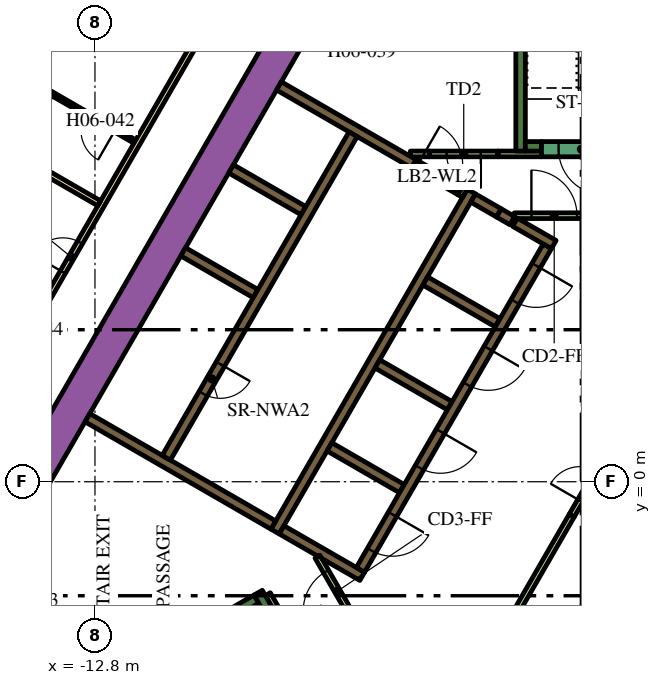
"""IFC4 building model, lengths in metres.
Left out: names, types, materials, properties, quantities, classifications, styles, units other than length and angle.
Written with IfcOpenShell. Run it as: python <this file> out.ifc"""

import sys

from ifc_helpers import new_model, si_unit, direction, frame, frame_2d, origin, place, context, subcontext, project, spatial, polyline, rectangle, outline, extrude, element, fill, save


model = new_model("IFC4")
c1 = context("Model", 3, precision=1e-05, world=origin(), true_north=direction((0.0, 1.0)))
c2 = subcontext(c1, "Body", "Model", "MODEL_VIEW")
j1 = project(units=[si_unit("LENGTHUNIT", "METRE"), si_unit("PLANEANGLEUNIT", "RADIAN")], contexts=[c1])
p1 = place(None, origin())
s1 = spatial("IfcSite", under=j1, at=p1, CompositionType="ELEMENT")
p2 = place(p1, origin())
s2 = spatial("IfcBuilding", under=s1, at=p2, CompositionType="ELEMENT")
p3 = place(p2, frame((0.0, 0.0, 83.7)))
s3 = spatial("IfcBuildingStorey", under=s2, at=p3, CompositionType="ELEMENT", Elevation=83.7)
p4 = place(p3, frame((-15.36, -1.503, 0.0), z_axis=(0.0, 0.0, 1.0), x_axis=(0.50000389221, 0.866023156604, 0.0)))
e1 = element("IfcWall", 1, at=p4, inside=s3, PredefinedType="SOLIDWALL", context=c2, shape_type="SweptSolid", body=[
    extrude(rectangle(XDim=21.0, YDim=0.9, at=frame_2d((10.5, 0.0))), origin(), (0.0, 0.0, 1.0), 3.9),
])
p5 = place(p3, frame((-1.6, 8.7, 0.0), z_axis=(0.0, 0.0, 1.0), x_axis=(0.0, 1.0, 0.0)))
e2 = element("IfcWall", 2, at=p5, inside=s3, PredefinedType="SOLIDWALL", context=c2, shape_type="SweptSolid", body=[
    extrude(rectangle(XDim=7.05, YDim=0.25, at=frame_2d((3.525, 0.0))), origin(), (0.0, 0.0, 1.0), 3.9),
])
p6 = place(p3, frame((-1.475, 8.825, 0.0), z_axis=(0.0, 0.0, 1.0), x_axis=(1.0, 0.0, 0.0)))
e3 = element("IfcWall", 3, at=p6, inside=s3, PredefinedType="SOLIDWALL", context=c2, shape_type="SweptSolid", body=[
    extrude(rectangle(XDim=0.425, YDim=0.25, at=frame_2d((0.212, 0.0))), origin(), (0.0, 0.0, 1.0), 3.9),
])
p7 = place(p3, frame((-14.44, -6.49, 0.0), z_axis=(0.0, 0.0, 1.0), x_axis=(0.866022966069, 0.500004222222, 0.0)))
e4 = element("IfcWall", 4, at=p7, inside=s3, PredefinedType="SOLIDWALL", context=c2, shape_type="SweptSolid", body=[
    extrude(rectangle(XDim=6.8, YDim=0.25, at=frame_2d((3.4, 0.0))), origin(), (0.0, 0.0, 1.0), 3.9),
])
p8 = place(p3, frame((-8.168, -3.503, 0.0), z_axis=(0.0, 0.0, 1.0), x_axis=(-0.499952099219, 0.866053057547, 0.0)))
e5 = element("IfcWall", 5, at=p8, inside=s3, PredefinedType="SOLIDWALL", context=c2, shape_type="SweptSolid", body=[
    extrude(rectangle(XDim=0.675, YDim=0.25, at=frame_2d((0.337, 0.0))), origin(), (0.0, 0.0, 1.0), 3.9),
])
p9 = place(p3, frame((-8.06, -1.311, 0.0), z_axis=(0.0, 0.0, 1.0), x_axis=(0.50000273126, 0.866023826885, 0.0)))
e6 = element("IfcWall", 6, at=p9, inside=s3, PredefinedType="SOLIDWALL", context=c2, shape_type="SweptSolid", body=[
    extrude(rectangle(XDim=10.33, YDim=0.25, at=frame_2d((5.165, 0.0))), origin(), (0.0, 0.0, 1.0), 3.9),
])
p10 = place(p3, frame((-1.819, 6.87, 0.0), z_axis=(0.0, 0.0, 1.0), x_axis=(-0.866294599386, 0.499533449405, 0.0)))
e7 = element("IfcWall", 7, at=p10, inside=s3, PredefinedType="SOLIDWALL", context=c2, shape_type="SweptSolid", body=[
    extrude(rectangle(XDim=0.41, YDim=0.25, at=frame_2d((0.205, 0.0))), origin(), (0.0, 0.0, 1.0), 3.9),
])
p11 = place(p3, frame((-2.849, 7.465, 0.0), z_axis=(0.0, 0.0, 1.0), x_axis=(0.865955664968, -0.500120771724, 0.0)))
e8 = element("IfcWall", 8, at=p11, inside=s3, PredefinedType="SOLIDWALL", context=c2, shape_type="SweptSolid", body=[
    extrude(rectangle(XDim=0.778, YDim=0.25, at=frame_2d((0.389, 0.0))), origin(), (0.0, 0.0, 1.0), 3.9),
])
p12 = place(p3, frame((-0.728, 6.24, 0.0), z_axis=(0.0, 0.0, 1.0), x_axis=(-0.866002680491, 0.500039355833, 0.0)))
e9 = element("IfcWall", 9, at=p12, inside=s3, PredefinedType="SOLIDWALL", context=c2, shape_type="SweptSolid", body=[
    extrude(rectangle(XDim=1.178, YDim=0.25, at=frame_2d((0.589, 0.0))), origin(), (0.0, 0.0, 1.0), 3.9),
])
for number, where, z_axis, x_axis in (
    (10, (-2.204, 4.182, 0.0), (0.0, 0.0, 1.0), (-0.866, 0.5, 0.0)),
    (11, (-5.369, 3.1, 0.0), (0.0, 0.0, 1.0), (0.866, -0.5, 0.0)),
    (12, (-4.724, -0.182, 0.0), (0.0, 0.0, 1.0), (-0.866, 0.5, 0.0)),
):
    element("IfcWall", number, at=place(p3, frame(where, z_axis=z_axis, x_axis=x_axis)), inside=s3, PredefinedType="SOLIDWALL", context=c2, shape_type="SweptSolid", body=[
        extrude(rectangle(XDim=2.2, YDim=0.25, at=frame_2d((1.1, 0.0))), origin(), (0.0, 0.0, 1.0), 3.9),
    ])
p13 = place(p3, origin())
e13 = element("IfcWall", 13, at=p13, inside=s3, PredefinedType="SOLIDWALL", context=c2, shape_type="SweptSolid", body=[
    extrude(outline(polyline([(-5.922, -2.257), (-5.922, -2.257), (-5.705, -2.382), (-5.83, -2.598), (-6.829, -2.021), (-6.88, -1.934), (-6.88, -1.934), (-6.93, -1.963), (-7.952, -1.373), (-7.827, -1.156), (-5.922, -2.257)])), origin(), (0.0, 0.0, 1.0), 3.9),
])
p14 = place(p3, frame((-8.106, -1.14, 0.0), z_axis=(0.0, 0.0, 1.0), x_axis=(-0.866000643155, 0.500042884217, 0.0)))
e14 = element("IfcWall", 14, at=p14, inside=s3, PredefinedType="SOLIDWALL", context=c2, shape_type="SweptSolid", body=[
    extrude(rectangle(XDim=5.65, YDim=0.25, at=frame_2d((2.825, 0.0))), origin(), (0.0, 0.0, 1.0), 3.9),
])
e15 = element("IfcWall", 15, at=p13, inside=s3, PredefinedType="SOLIDWALL", context=c2, shape_type="SweptSolid", body=[
    extrude(outline(polyline([(-3.128, 7.481), (-3.259, 7.557), (-3.134, 7.773), (-3.003, 7.698), (-3.128, 7.481)])), origin(), (0.0, 0.0, 1.0), 3.9),
])
for number, where, z_axis, x_axis in (
    (16, (-8.574, 4.95, 0.0), (0.0, 0.0, 1.0), (-0.866, 0.5, 0.0)),
    (17, (-7.314, 7.132, 0.0), (0.0, 0.0, 1.0), (-0.866, 0.5, 0.0)),
):
    element("IfcWall", number, at=place(p3, frame(where, z_axis=z_axis, x_axis=x_axis)), inside=s3, PredefinedType="SOLIDWALL", context=c2, shape_type="SweptSolid", body=[
        extrude(rectangle(XDim=2.2, YDim=0.25, at=frame_2d((1.1, 0.0))), origin(), (0.0, 0.0, 1.0), 3.9),
    ])
p15 = place(p3, frame((-7.959, 10.415, 0.0), z_axis=(0.0, 0.0, 1.0), x_axis=(0.866020958405, -0.500007699544, 0.0)))
e18 = element("IfcWall", 18, at=p15, inside=s3, PredefinedType="SOLIDWALL", context=c2, shape_type="SweptSolid", body=[
    extrude(rectangle(XDim=4.1, YDim=0.25, at=frame_2d((2.05, 0.0))), origin(), (0.0, 0.0, 1.0), 3.9),
])
p16 = place(p3, frame((-8.252, -2.958, 0.0), z_axis=(0.0, 0.0, 1.0), x_axis=(0.500174715838, -0.865924508047, 0.0)))
e19 = element("IfcWall", 19, at=p16, inside=s3, PredefinedType="PARTITIONING", context=c2, shape_type="SweptSolid", body=[
    extrude(rectangle(XDim=0.514, YDim=0.15, at=frame_2d((0.257, 0.0))), origin(), (0.0, 0.0, 1.0), 2.75),
])
p17 = place(p3, frame((-3.997, 8.625, 0.0), z_axis=(0.0, 0.0, 1.0), x_axis=(-1.0, 0.0, 0.0)))
e20 = element("IfcWall", 20, at=p17, inside=s3, PredefinedType="PARTITIONING", context=c2, shape_type="SweptSolid", body=[
    extrude(rectangle(XDim=0.502, YDim=0.15, at=frame_2d((0.251, 0.0))), origin(), (0.0, 0.0, 1.0), 2.75),
])
p18 = place(p3, frame((-1.887, -3.718, 0.0), z_axis=(0.0, 0.0, 1.0), x_axis=(0.500033287521, 0.866006184372, 0.0)))
e21 = element("IfcWall", 21, at=p18, inside=s3, PredefinedType="PARTITIONING", context=c2, shape_type="SweptSolid", body=[
    extrude(rectangle(XDim=3.263, YDim=0.15, at=frame_2d((1.632, 0.0))), origin(), (0.0, 0.0, 1.0), 2.75),
])
p19 = place(p3, frame((-2.196, 8.625, 0.0), z_axis=(0.0, 0.0, 1.0), x_axis=(1.0, 0.0, 0.0)))
e22 = element("IfcWall", 22, at=p19, inside=s3, PredefinedType="PARTITIONING", context=c2, shape_type="SweptSolid", body=[
    extrude(rectangle(XDim=1.146, YDim=0.15, at=frame_2d((0.573, 0.0))), origin(), (0.0, 0.0, 1.0), 2.75),
])
p20 = place(p3, frame((-6.008, 9.144, 0.0), z_axis=(0.0, 0.0, 1.0), x_axis=(-0.500006956611, -0.866021387346, 0.0)))
e23 = element("IfcWall", 23, at=p20, inside=s3, PredefinedType="SOLIDWALL", context=c2, shape_type="SweptSolid", body=[
    extrude(rectangle(XDim=9.83, YDim=0.25, at=frame_2d((4.915, 0.0))), origin(), (0.0, 0.0, 1.0), 3.9),
])
p21 = place(p20, frame((6.985, 0.0, 0.0)))
e24 = element("IfcOpeningElement", 24, at=p21, cuts=e23, PredefinedType="OPENING", context=c2, shape_type="SweptSolid", body=[
    extrude(rectangle(XDim=0.9, YDim=2.1, at=frame_2d((0.45, 1.05))), frame((0.0, 0.135, 0.0), z_axis=(0.0, -1.0, 0.0), x_axis=(1.0, 0.0, 0.0)), (0.0, 0.0, 1.0), 0.27),
])
p22 = place(p3, frame((-0.898, 6.194, 0.0), z_axis=(0.0, 0.0, 1.0), x_axis=(-0.499996202215, -0.866027596426, 0.0)))
e25 = element("IfcWall", 25, at=p22, inside=s3, PredefinedType="SOLIDWALL", context=c2, shape_type="SweptSolid", body=[
    extrude(rectangle(XDim=9.83, YDim=0.25, at=frame_2d((4.915, 0.0))), origin(), (0.0, 0.0, 1.0), 3.9),
])
p23 = place(p22, frame((0.585, 0.0, 0.0)))
e26 = element("IfcOpeningElement", 26, at=p23, cuts=e25, PredefinedType="OPENING", context=c2, shape_type="SweptSolid", body=[
    extrude(rectangle(XDim=1.1, YDim=2.1, at=frame_2d((0.55, 1.05))), frame((0.0, 0.135, 0.0), z_axis=(0.0, -1.0, 0.0), x_axis=(1.0, 0.0, 0.0)), (0.0, 0.0, 1.0), 0.27),
])
p24 = place(p22, frame((3.105, 0.0, 0.0)))
e27 = element("IfcOpeningElement", 27, at=p24, cuts=e25, PredefinedType="OPENING", context=c2, shape_type="SweptSolid", body=[
    extrude(rectangle(XDim=1.1, YDim=2.1, at=frame_2d((0.55, 1.05))), frame((0.0, 0.135, 0.0), z_axis=(0.0, -1.0, 0.0), x_axis=(1.0, 0.0, 0.0)), (0.0, 0.0, 1.0), 0.27),
])
p25 = place(p22, frame((5.625, 0.0, 0.0)))
e28 = element("IfcOpeningElement", 28, at=p25, cuts=e25, PredefinedType="OPENING", context=c2, shape_type="SweptSolid", body=[
    extrude(rectangle(XDim=1.1, YDim=2.1, at=frame_2d((0.55, 1.05))), frame((0.0, 0.135, 0.0), z_axis=(0.0, -1.0, 0.0), x_axis=(1.0, 0.0, 0.0)), (0.0, 0.0, 1.0), 0.27),
])
p26 = place(p22, frame((8.145, 0.0, 0.0)))
e29 = element("IfcOpeningElement", 29, at=p26, cuts=e25, PredefinedType="OPENING", context=c2, shape_type="SweptSolid", body=[
    extrude(rectangle(XDim=1.1, YDim=2.1, at=frame_2d((0.55, 1.05))), frame((0.0, 0.135, 0.0), z_axis=(0.0, -1.0, 0.0), x_axis=(1.0, 0.0, 0.0)), (0.0, 0.0, 1.0), 0.27),
])
p27 = place(p3, frame((1.05, 8.75, 0.0), z_axis=(0.0, 0.0, 1.0), x_axis=(-1.0, 0.0, 0.0)))
e30 = element("IfcWall", 30, at=p27, inside=s3, PredefinedType="SOLIDWALL", context=c2, shape_type="SweptSolid", body=[
    extrude(rectangle(XDim=2.1, YDim=0.4, at=frame_2d((1.05, 0.0))), origin(), (0.0, 0.0, 1.0), 3.9),
])
p28 = place(p27, frame((0.45, 0.0, 0.0)))
e31 = element("IfcOpeningElement", 31, at=p28, cuts=e30, PredefinedType="OPENING", context=c2, shape_type="SweptSolid", body=[
    extrude(rectangle(XDim=1.2, YDim=2.1, at=frame_2d((0.6, 1.05))), frame((0.0, 0.21, 0.0), z_axis=(0.0, -1.0, 0.0), x_axis=(1.0, 0.0, 0.0)), (0.0, 0.0, 1.0), 0.42),
])
p29 = place(p3, frame((-2.196, 8.625, 0.0), z_axis=(0.0, 0.0, 1.0), x_axis=(-1.0, 0.0, 0.0)))
e32 = element("IfcWall", 32, at=p29, inside=s3, PredefinedType="PARTITIONING", context=c2, shape_type="SweptSolid", body=[
    extrude(rectangle(XDim=1.8, YDim=0.15, at=frame_2d((0.9, 0.0))), origin(), (0.0, 0.0, 1.0), 2.75),
])
p30 = place(p29, frame((0.45, 0.0, 0.0)))
e33 = element("IfcOpeningElement", 33, at=p30, cuts=e32, PredefinedType="OPENING", context=c2, shape_type="SweptSolid", body=[
    extrude(rectangle(XDim=0.9, YDim=2.1, at=frame_2d((0.45, 1.05))), frame((0.0, 0.085, 0.0), z_axis=(0.0, -1.0, 0.0), x_axis=(1.0, 0.0, 0.0)), (0.0, 0.0, 1.0), 0.17),
])
p31 = place(p3, frame((-1.765, 7.0, 0.0), z_axis=(0.0, 0.0, 1.0), x_axis=(1.0, 0.0, 0.0)))
e34 = element("IfcWall", 34, at=p31, inside=s3, PredefinedType="PARTITIONING", context=c2, shape_type="SweptSolid", body=[
    extrude(rectangle(XDim=2.1, YDim=0.15, at=frame_2d((1.05, 0.0))), origin(), (0.0, 0.0, 1.0), 2.75),
])
p32 = place(p31, frame((0.45, 0.0, 0.0)))
e35 = element("IfcOpeningElement", 35, at=p32, cuts=e34, PredefinedType="OPENING", context=c2, shape_type="SweptSolid", body=[
    extrude(rectangle(XDim=1.2, YDim=2.1, at=frame_2d((0.6, 1.05))), frame((0.0, 0.085, 0.0), z_axis=(0.0, -1.0, 0.0), x_axis=(1.0, 0.0, 0.0)), (0.0, 0.0, 1.0), 0.17),
])
p33 = place(p3, frame((-5.895, -3.79, 0.0), z_axis=(0.0, 0.0, 1.0), x_axis=(-0.49994051562, 0.866059744384, 0.0)))
e36 = element("IfcWall", 36, at=p33, inside=s3, PredefinedType="PARTITIONING", context=c2, shape_type="SweptSolid", body=[
    extrude(rectangle(XDim=2.1, YDim=0.15, at=frame_2d((1.05, 0.0))), origin(), (0.0, 0.0, 1.0), 2.75),
])
p34 = place(p33, frame((0.45, 0.0, 0.0)))
e37 = element("IfcOpeningElement", 37, at=p34, cuts=e36, PredefinedType="OPENING", context=c2, shape_type="SweptSolid", body=[
    extrude(rectangle(XDim=1.2, YDim=2.1, at=frame_2d((0.6, 1.05))), frame((0.0, 0.085, 0.0), z_axis=(0.0, -1.0, 0.0), x_axis=(1.0, 0.0, 0.0)), (0.0, 0.0, 1.0), 0.17),
])
p35 = place(p3, frame((-4.409, 8.365, 0.0), z_axis=(0.0, 0.0, 1.0), x_axis=(0.866034573852, -0.49998411664, 0.0)))
e38 = element("IfcWall", 38, at=p35, inside=s3, PredefinedType="SOLIDWALL", context=c2, shape_type="SweptSolid", body=[
    extrude(rectangle(XDim=1.4, YDim=0.25, at=frame_2d((0.7, 0.0))), origin(), (0.0, 0.0, 1.0), 3.9),
])
p36 = place(p35, frame((0.1, 0.0, 0.0)))
e39 = element("IfcOpeningElement", 39, at=p36, cuts=e38, PredefinedType="OPENING", context=c2, shape_type="SweptSolid", body=[
    extrude(rectangle(XDim=1.2, YDim=2.1, at=frame_2d((0.6, 1.05))), frame((0.0, 0.135, 0.0), z_axis=(0.0, -1.0, 0.0), x_axis=(1.0, 0.0, 0.0)), (0.0, 0.0, 1.0), 0.27),
])
p37 = place(p3, frame((-0.255, -0.892, 0.0), z_axis=(0.0, 0.0, 1.0), x_axis=(0.500062916607, 0.865989075817, 0.0)))
e40 = element("IfcWall", 40, at=p37, inside=s3, PredefinedType="PARTITIONING", context=c2, shape_type="SweptSolid", body=[
    extrude(rectangle(XDim=1.8, YDim=0.15, at=frame_2d((0.9, 0.0))), origin(), (0.0, 0.0, 1.0), 2.75),
])
p38 = place(p37, frame((0.45, 0.0, 0.0)))
e41 = element("IfcOpeningElement", 41, at=p38, cuts=e40, PredefinedType="OPENING", context=c2, shape_type="SweptSolid", body=[
    extrude(rectangle(XDim=0.9, YDim=2.1, at=frame_2d((0.45, 1.05))), frame((0.0, 0.085, 0.0), z_axis=(0.0, -1.0, 0.0), x_axis=(1.0, 0.0, 0.0)), (0.0, 0.0, 1.0), 0.17),
])
p39 = place(p3, frame((-19.081, -3.9, 0.0), z_axis=(0.0, 0.0, 1.0), x_axis=(0.499998313975, 0.866026377209, 0.0)))
e42 = element("IfcWall", 42, at=p39, inside=s3, PredefinedType="PARTITIONING", context=c2, shape_type="SweptSolid", body=[
    extrude(rectangle(XDim=25.766, YDim=0.15, at=frame_2d((12.883, 0.0))), origin(), (0.0, 0.0, 1.0), 2.75),
])
p40 = place(p39, frame((19.306, 0.0, 0.0)))
e43 = element("IfcOpeningElement", 43, at=p40, cuts=e42, PredefinedType="OPENING", context=c2, shape_type="SweptSolid", body=[
    extrude(rectangle(XDim=1.0, YDim=2.1, at=frame_2d((0.5, 1.05))), frame((0.0, 0.085, 0.0), z_axis=(0.0, -1.0, 0.0), x_axis=(1.0, 0.0, 0.0)), (0.0, 0.0, 1.0), 0.17),
])
p41 = place(p39, frame((18.0, 0.0, 0.0)))
e44 = element("IfcOpeningElement", 44, at=p41, cuts=e42, PredefinedType="OPENING", context=c2, shape_type="SweptSolid", body=[
    extrude(rectangle(XDim=1.0, YDim=2.1, at=frame_2d((0.5, 1.05))), frame((0.0, 0.085, 0.0), z_axis=(0.0, -1.0, 0.0), x_axis=(1.0, 0.0, 0.0)), (0.0, 0.0, 1.0), 0.17),
])
p42 = place(p39, frame((10.874, 0.0, 0.0)))
e45 = element("IfcOpeningElement", 45, at=p42, cuts=e42, PredefinedType="OPENING", context=c2, shape_type="SweptSolid", body=[
    extrude(rectangle(XDim=0.9, YDim=2.1, at=frame_2d((0.45, 1.05))), frame((0.0, 0.085, 0.0), z_axis=(0.0, -1.0, 0.0), x_axis=(1.0, 0.0, 0.0)), (0.0, 0.0, 1.0), 0.17),
])
p43 = place(p39, frame((8.548, 0.0, 0.0)))
e46 = element("IfcOpeningElement", 46, at=p43, cuts=e42, PredefinedType="OPENING", context=c2, shape_type="SweptSolid", body=[
    extrude(rectangle(XDim=1.1, YDim=2.1, at=frame_2d((0.55, 1.05))), frame((0.0, 0.085, 0.0), z_axis=(0.0, -1.0, 0.0), x_axis=(1.0, 0.0, 0.0)), (0.0, 0.0, 1.0), 0.17),
])
p44 = place(p39, frame((0.18, 0.0, 0.0)))
e47 = element("IfcOpeningElement", 47, at=p44, cuts=e42, PredefinedType="OPENING", context=c2, shape_type="SweptSolid", body=[
    extrude(rectangle(XDim=1.0, YDim=2.1, at=frame_2d((0.5, 1.05))), frame((0.0, 0.085, 0.0), z_axis=(0.0, -1.0, 0.0), x_axis=(1.0, 0.0, 0.0)), (0.0, 0.0, 1.0), 0.17),
])
p45 = place(p3, frame((-18.484, 10.672, 0.0), z_axis=(0.0, 0.0, 1.0), x_axis=(0.866019162053, -0.50001081084, 0.0)))
e48 = element("IfcWall", 48, at=p45, inside=s3, PredefinedType="PARTITIONING", context=c2, shape_type="SweptSolid", body=[
    extrude(rectangle(XDim=6.694, YDim=0.15, at=frame_2d((3.347, 0.0))), origin(), (0.0, 0.0, 1.0), 2.75),
])
p46 = place(p3, frame((-11.75, 8.949, 0.0), z_axis=(0.0, 0.0, 1.0), x_axis=(-0.865997922154, 0.500047596559, 0.0)))
e49 = element("IfcWall", 49, at=p46, inside=s3, PredefinedType="PARTITIONING", context=c2, shape_type="SweptSolid", body=[
    extrude(rectangle(XDim=2.6, YDim=0.1, at=frame_2d((1.3, 0.0))), origin(), (0.0, 0.0, 1.0), 2.75),
])
p47 = place(p46, frame((0.6, 0.0, 0.0)))
e50 = element("IfcOpeningElement", 50, at=p47, cuts=e49, PredefinedType="OPENING", context=c2, shape_type="SweptSolid", body=[
    extrude(rectangle(XDim=0.9, YDim=2.1, at=frame_2d((0.45, 1.05))), frame((0.0, 0.06, 0.0), z_axis=(0.0, -1.0, 0.0), x_axis=(1.0, 0.0, 0.0)), (0.0, 0.0, 1.0), 0.12),
])
p48 = place(p21, origin())
e51 = element("IfcDoor", 51, at=p48, inside=s3, OperationType="SINGLE_SWING_LEFT", PredefinedType="DOOR", context=c2, shape_type="SweptSolid", body=[
    extrude(rectangle(XDim=0.9, YDim=2.1, at=frame_2d((0.45, 1.05))), frame((0.0, 0.025, 0.0), z_axis=(0.0, -1.0, 0.0), x_axis=(1.0, 0.0, 0.0)), (0.0, 0.0, 1.0), 0.05),
])
fill(e24, e51)
p49 = place(p23, origin())
e52 = element("IfcDoor", 52, at=p49, inside=s3, OperationType="DOUBLE_DOOR_SLIDING", PredefinedType="DOOR", context=c2, shape_type="SweptSolid", body=[
    extrude(rectangle(XDim=1.1, YDim=2.1, at=frame_2d((0.55, 1.05))), frame((0.0, 0.025, 0.0), z_axis=(0.0, -1.0, 0.0), x_axis=(1.0, 0.0, 0.0)), (0.0, 0.0, 1.0), 0.05),
])
fill(e26, e52)
p50 = place(p24, origin())
e53 = element("IfcDoor", 53, at=p50, inside=s3, OperationType="DOUBLE_DOOR_SLIDING", PredefinedType="DOOR", context=c2, shape_type="SweptSolid", body=[
    extrude(rectangle(XDim=1.1, YDim=2.1, at=frame_2d((0.55, 1.05))), frame((0.0, 0.025, 0.0), z_axis=(0.0, -1.0, 0.0), x_axis=(1.0, 0.0, 0.0)), (0.0, 0.0, 1.0), 0.05),
])
fill(e27, e53)
p51 = place(p25, origin())
e54 = element("IfcDoor", 54, at=p51, inside=s3, OperationType="DOUBLE_DOOR_SLIDING", PredefinedType="DOOR", context=c2, shape_type="SweptSolid", body=[
    extrude(rectangle(XDim=1.1, YDim=2.1, at=frame_2d((0.55, 1.05))), frame((0.0, 0.025, 0.0), z_axis=(0.0, -1.0, 0.0), x_axis=(1.0, 0.0, 0.0)), (0.0, 0.0, 1.0), 0.05),
])
fill(e28, e54)
p52 = place(p26, origin())
e55 = element("IfcDoor", 55, at=p52, inside=s3, OperationType="DOUBLE_DOOR_SLIDING", PredefinedType="DOOR", context=c2, shape_type="SweptSolid", body=[
    extrude(rectangle(XDim=1.1, YDim=2.1, at=frame_2d((0.55, 1.05))), frame((0.0, 0.025, 0.0), z_axis=(0.0, -1.0, 0.0), x_axis=(1.0, 0.0, 0.0)), (0.0, 0.0, 1.0), 0.05),
])
fill(e29, e55)
p53 = place(p28, origin())
e56 = element("IfcDoor", 56, at=p53, inside=s3, OperationType="SINGLE_SWING_LEFT", PredefinedType="DOOR", context=c2, shape_type="SweptSolid", body=[
    extrude(rectangle(XDim=1.2, YDim=2.1, at=frame_2d((0.6, 1.05))), frame((0.0, 0.025, 0.0), z_axis=(0.0, -1.0, 0.0), x_axis=(1.0, 0.0, 0.0)), (0.0, 0.0, 1.0), 0.05),
])
fill(e31, e56)
p54 = place(p30, origin())
e57 = element("IfcDoor", 57, at=p54, inside=s3, OperationType="SINGLE_SWING_LEFT", PredefinedType="DOOR", context=c2, shape_type="SweptSolid", body=[
    extrude(rectangle(XDim=0.9, YDim=2.1, at=frame_2d((0.45, 1.05))), frame((0.0, 0.025, 0.0), z_axis=(0.0, -1.0, 0.0), x_axis=(1.0, 0.0, 0.0)), (0.0, 0.0, 1.0), 0.05),
])
fill(e33, e57)
p55 = place(p32, origin())
e58 = element("IfcDoor", 58, at=p55, inside=s3, OperationType="SINGLE_SWING_LEFT", PredefinedType="DOOR", context=c2, shape_type="SweptSolid", body=[
    extrude(rectangle(XDim=1.2, YDim=2.1, at=frame_2d((0.6, 1.05))), frame((0.0, 0.025, 0.0), z_axis=(0.0, -1.0, 0.0), x_axis=(1.0, 0.0, 0.0)), (0.0, 0.0, 1.0), 0.05),
])
fill(e35, e58)
p56 = place(p34, origin())
e59 = element("IfcDoor", 59, at=p56, inside=s3, OperationType="SINGLE_SWING_LEFT", PredefinedType="DOOR", context=c2, shape_type="SweptSolid", body=[
    extrude(rectangle(XDim=1.2, YDim=2.1, at=frame_2d((0.6, 1.05))), frame((0.0, 0.025, 0.0), z_axis=(0.0, -1.0, 0.0), x_axis=(1.0, 0.0, 0.0)), (0.0, 0.0, 1.0), 0.05),
])
fill(e37, e59)
p57 = place(p36, origin())
e60 = element("IfcDoor", 60, at=p57, inside=s3, OperationType="SINGLE_SWING_LEFT", PredefinedType="DOOR", context=c2, shape_type="SweptSolid", body=[
    extrude(rectangle(XDim=1.2, YDim=2.1, at=frame_2d((0.6, 1.05))), frame((0.0, 0.025, 0.0), z_axis=(0.0, -1.0, 0.0), x_axis=(1.0, 0.0, 0.0)), (0.0, 0.0, 1.0), 0.05),
])
fill(e39, e60)
p58 = place(p38, origin())
e61 = element("IfcDoor", 61, at=p58, inside=s3, OperationType="SINGLE_SWING_LEFT", PredefinedType="DOOR", context=c2, shape_type="SweptSolid", body=[
    extrude(rectangle(XDim=0.9, YDim=2.1, at=frame_2d((0.45, 1.05))), frame((0.0, 0.025, 0.0), z_axis=(0.0, -1.0, 0.0), x_axis=(1.0, 0.0, 0.0)), (0.0, 0.0, 1.0), 0.05),
])
fill(e41, e61)
p59 = place(p47, origin())
e62 = element("IfcDoor", 62, at=p59, inside=s3, OperationType="SINGLE_SWING_LEFT", PredefinedType="DOOR", context=c2, shape_type="SweptSolid", body=[
    extrude(rectangle(XDim=0.9, YDim=2.1, at=frame_2d((0.45, 1.05))), frame((0.0, 0.025, 0.0), z_axis=(0.0, -1.0, 0.0), x_axis=(1.0, 0.0, 0.0)), (0.0, 0.0, 1.0), 0.05),
])
fill(e50, e62)
p60 = place(p42, origin())
e63 = element("IfcDoor", 63, at=p60, inside=s3, OperationType="SINGLE_SWING_LEFT", PredefinedType="DOOR", context=c2, shape_type="SweptSolid", body=[
    extrude(rectangle(XDim=0.9, YDim=2.1, at=frame_2d((0.45, 1.05))), frame((0.0, 0.025, 0.0), z_axis=(0.0, -1.0, 0.0), x_axis=(1.0, 0.0, 0.0)), (0.0, 0.0, 1.0), 0.05),
])
fill(e45, e63)
save(model, sys.argv[1])
